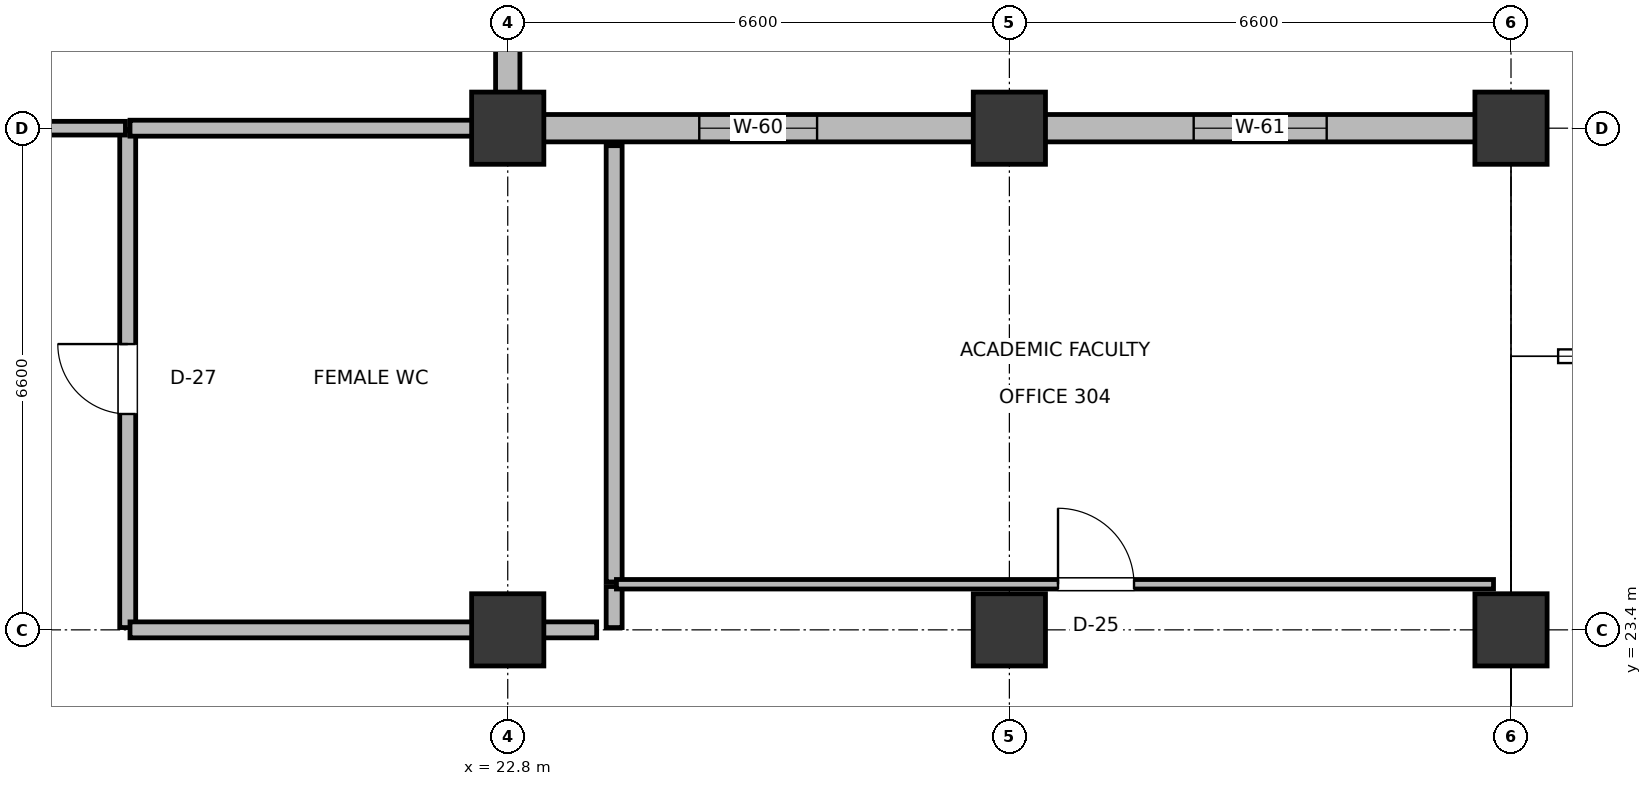
"""IFC4 building model, lengths in metres.
Left out: names, types, materials, properties, quantities, classifications, styles, units other than length and angle.
Written with IfcOpenShell. Run it as: python <this file> out.ifc"""

import sys

from ifc_helpers import new_model, si_unit, direction, frame, frame_2d, origin, origin_2d, place, context, subcontext, project, spatial, rectangle, extrude, element, fill, save


model = new_model("IFC4")
c1 = context("Model", 3, precision=1e-05, world=origin(), true_north=direction((0.0, 1.0)))
c2 = subcontext(c1, "Body", "Model", "MODEL_VIEW")
j1 = project(units=[si_unit("LENGTHUNIT", "METRE"), si_unit("PLANEANGLEUNIT", "RADIAN")], contexts=[c1])
p1 = place(None, origin())
s1 = spatial("IfcSite", under=j1, at=p1, CompositionType="ELEMENT")
p2 = place(p1, origin())
s2 = spatial("IfcBuilding", under=s1, at=p2, CompositionType="ELEMENT")
p3 = place(p2, frame((0.0, 0.0, 15.0)))
s3 = spatial("IfcBuildingStorey", under=s2, at=p3, CompositionType="ELEMENT", Elevation=15.0)
for number, where, z_axis, x_axis in (
    (1, (22.8, 23.4, 0.0), (0.0, 0.0, 1.0), (1.0, 0.0, 0.0)),
    (2, (22.8, 30.0, 0.0), (0.0, 0.0, 1.0), (1.0, 0.0, 0.0)),
    (3, (29.4, 23.4, 0.0), (0.0, 0.0, 1.0), (1.0, 0.0, 0.0)),
    (4, (29.4, 30.0, 0.0), (0.0, 0.0, 1.0), (1.0, 0.0, 0.0)),
    (5, (36.0, 23.4, 0.0), (0.0, 0.0, 1.0), (1.0, 0.0, 0.0)),
    (6, (36.0, 30.0, 0.0), (0.0, 0.0, 1.0), (1.0, 0.0, 0.0)),
):
    element("IfcColumn", number, at=place(p3, frame(where, z_axis=z_axis, x_axis=x_axis)), inside=s3, PredefinedType="COLUMN", context=c2, shape_type="SweptSolid", body=[
        extrude(rectangle(XDim=0.95, YDim=0.95, at=origin_2d()), origin(), (0.0, 0.0, 1.0), 4.5),
    ])
p4 = place(p3, frame((23.255, 30.0, 0.0), z_axis=(0.0, 0.0, 1.0), x_axis=(1.0, 0.0, 0.0)))
e7 = element("IfcWall", 7, at=p4, inside=s3, PredefinedType="SOLIDWALL", context=c2, shape_type="SweptSolid", body=[
    extrude(rectangle(XDim=5.68, YDim=0.36, at=frame_2d((2.84, 0.0))), origin(), (0.0, 0.0, 1.0), 3.435),
])
p5 = place(p4, frame((2.065, 0.0, 0.9)))
e8 = element("IfcOpeningElement", 8, at=p5, cuts=e7, PredefinedType="OPENING", context=c2, shape_type="SweptSolid", body=[
    extrude(rectangle(XDim=1.55, YDim=1.75, at=frame_2d((0.775, 0.875))), frame((0.0, 0.19, 0.0), z_axis=(0.0, -1.0, 0.0), x_axis=(1.0, 0.0, 0.0)), (0.0, 0.0, 1.0), 0.38),
])
p6 = place(p3, frame((29.855, 30.0, 0.0), z_axis=(0.0, 0.0, 1.0), x_axis=(1.0, 0.0, 0.0)))
e9 = element("IfcWall", 9, at=p6, inside=s3, PredefinedType="SOLIDWALL", context=c2, shape_type="SweptSolid", body=[
    extrude(rectangle(XDim=5.69, YDim=0.36, at=frame_2d((2.845, 0.0))), origin(), (0.0, 0.0, 1.0), 3.525),
])
p7 = place(p6, frame((1.97, 0.0, 0.9)))
e10 = element("IfcOpeningElement", 10, at=p7, cuts=e9, PredefinedType="OPENING", context=c2, shape_type="SweptSolid", body=[
    extrude(rectangle(XDim=1.75, YDim=1.15, at=frame_2d((0.875, 0.575))), frame((0.0, 0.19, 0.0), z_axis=(0.0, -1.0, 0.0), x_axis=(1.0, 0.0, 0.0)), (0.0, 0.0, 1.0), 0.38),
])
p8 = place(p3, frame((22.8, 30.455, 0.0), z_axis=(0.0, 0.0, 1.0), x_axis=(0.0, 1.0, 0.0)))
e11 = element("IfcWall", 11, at=p8, inside=s3, PredefinedType="SOLIDWALL", context=c2, shape_type="SweptSolid", body=[
    extrude(rectangle(XDim=8.16, YDim=0.32, at=frame_2d((4.08, 0.0))), origin(), (0.0, 0.0, 1.0), 3.525),
])
p9 = place(p8, frame((3.105, 0.0, 0.9)))
e12 = element("IfcOpeningElement", 12, at=p9, cuts=e11, PredefinedType="OPENING", context=c2, shape_type="SweptSolid", body=[
    extrude(rectangle(XDim=1.95, YDim=1.75, at=frame_2d((0.975, 0.875))), frame((0.0, 0.17, 0.0), z_axis=(0.0, -1.0, 0.0), x_axis=(1.0, 0.0, 0.0)), (0.0, 0.0, 1.0), 0.34),
])
p10 = place(p3, frame((24.2, 24.03, 0.0), z_axis=(0.0, 0.0, 1.0), x_axis=(0.0, 1.0, 0.0)))
e13 = element("IfcWall", 13, at=p10, inside=s3, PredefinedType="PLUMBINGWALL", context=c2, shape_type="SweptSolid", body=[
    extrude(rectangle(XDim=5.74, YDim=0.21, at=frame_2d((2.87, 0.0))), origin(), (0.0, 0.0, 1.0), 3.435),
])
p11 = place(p3, frame((24.2, 23.43, 0.0), z_axis=(0.0, 0.0, 1.0), x_axis=(0.0, 1.0, 0.0)))
e14 = element("IfcWall", 14, at=p11, inside=s3, PredefinedType="PLUMBINGWALL", context=c2, shape_type="SweptSolid", body=[
    extrude(rectangle(XDim=0.54, YDim=0.21, at=frame_2d((0.27, 0.0))), origin(), (0.0, 0.0, 1.0), 3.755),
])
p12 = place(p3, frame((17.8, 23.43, 0.0), z_axis=(0.0, 0.0, 1.0), x_axis=(0.0, 1.0, 0.0)))
e15 = element("IfcWall", 15, at=p12, inside=s3, PredefinedType="PLUMBINGWALL", context=c2, shape_type="SweptSolid", body=[
    extrude(rectangle(XDim=6.54, YDim=0.21, at=frame_2d((3.27, 0.0))), origin(), (0.0, 0.0, 1.0), 3.425),
])
p13 = place(p12, frame((2.81, 0.0, 0.0)))
e16 = element("IfcOpeningElement", 16, at=p13, cuts=e15, PredefinedType="OPENING", context=c2, shape_type="SweptSolid", body=[
    extrude(rectangle(XDim=0.92, YDim=2.1, at=frame_2d((0.46, 1.05))), frame((0.0, 0.115, 0.0), z_axis=(0.0, -1.0, 0.0), x_axis=(1.0, 0.0, 0.0)), (0.0, 0.0, 1.0), 0.23),
])
p14 = place(p3, frame((17.83, 23.4, 0.0), z_axis=(0.0, 0.0, 1.0), x_axis=(1.0, 0.0, 0.0)))
e17 = element("IfcWall", 17, at=p14, inside=s3, PredefinedType="PLUMBINGWALL", context=c2, shape_type="SweptSolid", body=[
    extrude(rectangle(XDim=6.14, YDim=0.21, at=frame_2d((3.07, 0.0))), origin(), (0.0, 0.0, 1.0), 3.525),
])
p15 = place(p3, frame((17.83, 30.0, 0.0), z_axis=(0.0, 0.0, 1.0), x_axis=(1.0, 0.0, 0.0)))
e18 = element("IfcWall", 18, at=p15, inside=s3, PredefinedType="PLUMBINGWALL", context=c2, shape_type="SweptSolid", body=[
    extrude(rectangle(XDim=4.74, YDim=0.21, at=frame_2d((2.37, 0.0))), origin(), (0.0, 0.0, 1.0), 3.425),
])
p16 = place(p3, frame((24.23, 24.0, 0.0), z_axis=(0.0, 0.0, 1.0), x_axis=(1.0, 0.0, 0.0)))
e19 = element("IfcWall", 19, at=p16, inside=s3, PredefinedType="PARTITIONING", context=c2, shape_type="SweptSolid", body=[
    extrude(rectangle(XDim=11.54, YDim=0.125, at=frame_2d((5.77, 0.0))), origin(), (0.0, 0.0, 1.0), 3.605),
])
p17 = place(p16, frame((5.81, 0.0, 0.0)))
e20 = element("IfcOpeningElement", 20, at=p17, cuts=e19, PredefinedType="OPENING", context=c2, shape_type="SweptSolid", body=[
    extrude(rectangle(XDim=1.0, YDim=2.15, at=frame_2d((0.5, 1.075))), frame((0.0, 0.073, 0.0), z_axis=(0.0, -1.0, 0.0), x_axis=(1.0, 0.0, 0.0)), (0.0, 0.0, 1.0), 0.145),
])
p18 = place(p3, frame((13.43, 30.0, 0.0), z_axis=(0.0, 0.0, 1.0), x_axis=(1.0, 0.0, 0.0)))
e21 = element("IfcWall", 21, at=p18, inside=s3, PredefinedType="PARTITIONING", context=c2, shape_type="SweptSolid", body=[
    extrude(rectangle(XDim=4.34, YDim=0.18, at=frame_2d((2.17, 0.0))), origin(), (0.0, 0.0, 1.0), 3.395),
])
p19 = place(p18, frame((1.105, 0.0, 0.0)))
e22 = element("IfcOpeningElement", 22, at=p19, cuts=e21, PredefinedType="OPENING", context=c2, shape_type="SweptSolid", body=[
    extrude(rectangle(XDim=1.05, YDim=2.2, at=frame_2d((0.525, 1.1))), frame((0.0, 0.1, 0.0), z_axis=(0.0, -1.0, 0.0), x_axis=(1.0, 0.0, 0.0)), (0.0, 0.0, 1.0), 0.2),
])
p20 = place(p5, origin())
e23 = element("IfcWindow", 23, at=p20, inside=s3, PartitioningType="DOUBLE_PANEL_VERTICAL", PredefinedType="WINDOW", context=c2, shape_type="SweptSolid", body=[
    extrude(rectangle(XDim=1.55, YDim=1.75, at=frame_2d((0.775, 0.875))), frame((0.0, 0.03, 0.0), z_axis=(0.0, -1.0, 0.0), x_axis=(1.0, 0.0, 0.0)), (0.0, 0.0, 1.0), 0.06),
])
fill(e8, e23)
p21 = place(p7, origin())
e24 = element("IfcWindow", 24, at=p21, inside=s3, PartitioningType="DOUBLE_PANEL_VERTICAL", PredefinedType="WINDOW", context=c2, shape_type="SweptSolid", body=[
    extrude(rectangle(XDim=1.75, YDim=1.15, at=frame_2d((0.875, 0.575))), frame((0.0, 0.03, 0.0), z_axis=(0.0, -1.0, 0.0), x_axis=(1.0, 0.0, 0.0)), (0.0, 0.0, 1.0), 0.06),
])
fill(e10, e24)
p22 = place(p13, origin())
e25 = element("IfcDoor", 25, at=p22, inside=s3, OperationType="SINGLE_SWING_RIGHT", PredefinedType="DOOR", context=c2, shape_type="SweptSolid", body=[
    extrude(rectangle(XDim=0.92, YDim=2.1, at=frame_2d((0.46, 1.05))), frame((0.0, 0.025, 0.0), z_axis=(0.0, -1.0, 0.0), x_axis=(1.0, 0.0, 0.0)), (0.0, 0.0, 1.0), 0.05),
])
fill(e16, e25)
p23 = place(p17, origin())
e26 = element("IfcDoor", 26, at=p23, inside=s3, OperationType="SINGLE_SWING_LEFT", PredefinedType="DOOR", context=c2, shape_type="SweptSolid", body=[
    extrude(rectangle(XDim=1.0, YDim=2.15, at=frame_2d((0.5, 1.075))), frame((0.0, 0.025, 0.0), z_axis=(0.0, -1.0, 0.0), x_axis=(1.0, 0.0, 0.0)), (0.0, 0.0, 1.0), 0.05),
])
fill(e20, e26)
save(model, sys.argv[1])
